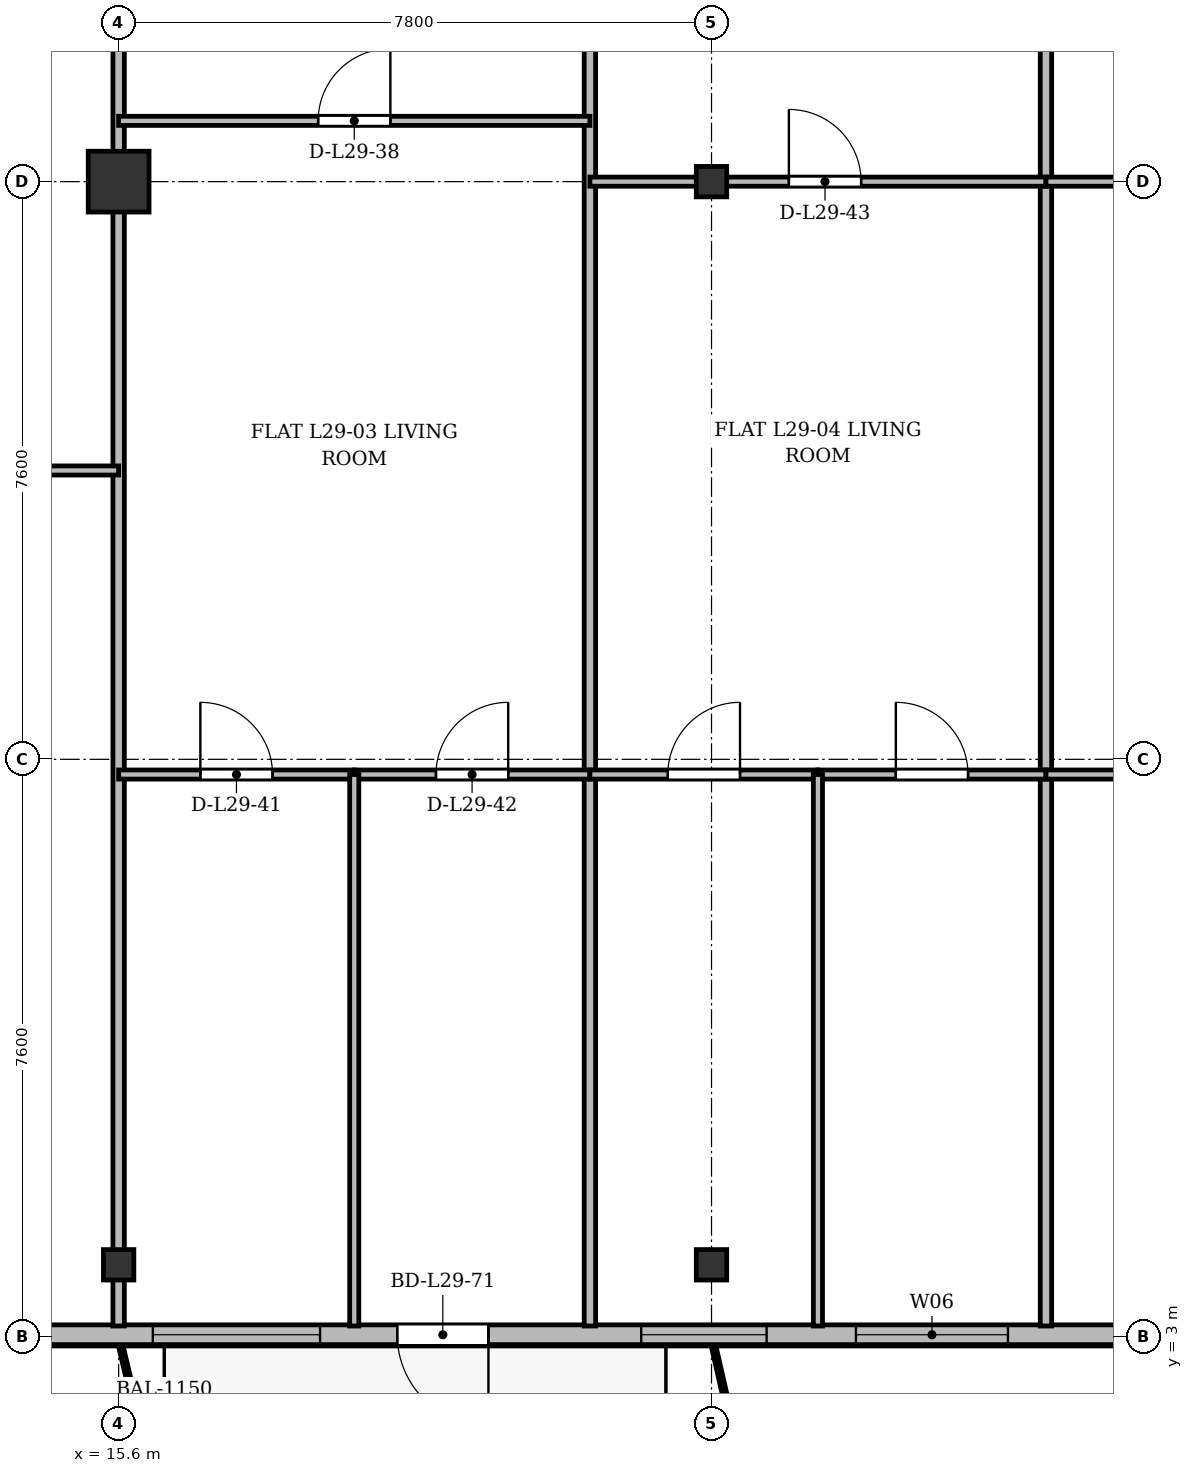
"""IFC4 building model, lengths in metres.
Left out: names, types, materials, properties, quantities, classifications, styles, units other than length and angle.
Written with IfcOpenShell. Run it as: python <this file> out.ifc"""

import sys

from ifc_helpers import new_model, si_unit, direction, frame, frame_2d, origin, origin_2d, place, context, subcontext, project, spatial, rectangle, i_section, extrude, source, transform, mapped, element, fill, save


model = new_model("IFC4")
c1 = context("Model", 3, precision=1e-05, world=origin(), true_north=direction((0.0, 1.0)))
c2 = subcontext(c1, "Body", "Model", "MODEL_VIEW")
j1 = project(units=[si_unit("LENGTHUNIT", "METRE"), si_unit("PLANEANGLEUNIT", "RADIAN")], contexts=[c1])
p1 = place(None, origin())
s1 = spatial("IfcSite", under=j1, at=p1, CompositionType="ELEMENT")
p2 = place(p1, origin())
s2 = spatial("IfcBuilding", under=s1, at=p2, CompositionType="ELEMENT")
p3 = place(p2, frame((0.0, 0.0, 114.1)))
s3 = spatial("IfcBuildingStorey", under=s2, at=p3, CompositionType="ELEMENT", Elevation=114.1)
m1 = source(origin(), c2, "Body", "SweptSolid", [
    extrude(i_section(OverallWidth=0.4, OverallDepth=0.4, WebThickness=0.022, FlangeThickness=0.035, at=origin_2d()), origin(), (0.0, 0.0, 1.0), 3.6),
])
p4 = place(p3, frame((15.6, 3.95, 0.0), z_axis=(0.0, 0.0, 1.0), x_axis=(1.0, 0.0, 0.0)))
e1 = element("IfcColumn", 1, at=p4, inside=s3, PredefinedType="COLUMN", context=c2, shape_type="MappedRepresentation", body=[
    mapped(m1, transform((0.0, 0.0, 0.0), x_axis=(1.0, 0.0, 0.0), y_axis=(0.0, 1.0, 0.0), z_axis=(0.0, 0.0, 1.0), scale=1.0)),
])
m2 = source(origin(), c2, "Body", "SweptSolid", [
    extrude(rectangle(XDim=0.8, YDim=0.8, at=origin_2d()), origin(), (0.0, 0.0, 1.0), 3.6),
])
p5 = place(p3, frame((15.6, 18.2, 0.0), z_axis=(0.0, 0.0, 1.0), x_axis=(1.0, 0.0, 0.0)))
e2 = element("IfcColumn", 2, at=p5, inside=s3, PredefinedType="COLUMN", context=c2, shape_type="MappedRepresentation", body=[
    mapped(m2, transform((0.0, 0.0, 0.0), x_axis=(1.0, 0.0, 0.0), y_axis=(0.0, 1.0, 0.0), z_axis=(0.0, 0.0, 1.0), scale=1.0)),
])
for number, where, z_axis, x_axis in (
    (3, (23.4, 3.95, 0.0), (0.0, 0.0, 1.0), (1.0, 0.0, 0.0)),
    (4, (23.4, 18.2, 0.0), (0.0, 0.0, 1.0), (1.0, 0.0, 0.0)),
):
    element("IfcColumn", number, at=place(p3, frame(where, z_axis=z_axis, x_axis=x_axis)), inside=s3, PredefinedType="COLUMN", context=c2, shape_type="MappedRepresentation", body=[
        mapped(m1, transform((0.0, 0.0, 0.0), x_axis=(1.0, 0.0, 0.0), y_axis=(0.0, 1.0, 0.0), z_axis=(0.0, 0.0, 1.0), scale=1.0)),
    ])
p6 = place(p3, frame((66.9, 3.03, 0.0), z_axis=(0.0, 0.0, 1.0), x_axis=(-1.0, 0.0, 0.0)))
e5 = element("IfcWall", 5, at=p6, inside=s3, PredefinedType="SOLIDWALL", context=c2, shape_type="SweptSolid", body=[
    extrude(rectangle(XDim=59.4, YDim=0.26, at=frame_2d((29.7, 0.0))), origin(), (0.0, 0.0, 1.0), 3.34),
])
p7 = place(p6, frame((0.47, 0.0, 0.9)))
e6 = element("IfcOpeningElement", 6, at=p7, cuts=e5, PredefinedType="OPENING", context=c2, shape_type="SweptSolid", body=[
    extrude(rectangle(XDim=1.65, YDim=1.85, at=frame_2d((0.825, 0.925))), frame((0.0, 0.14, 0.0), z_axis=(0.0, -1.0, 0.0), x_axis=(1.0, 0.0, 0.0)), (0.0, 0.0, 1.0), 0.28),
])
p8 = place(p6, frame((4.4, 0.0, 0.9)))
e7 = element("IfcOpeningElement", 7, at=p8, cuts=e5, PredefinedType="OPENING", context=c2, shape_type="SweptSolid", body=[
    extrude(rectangle(XDim=1.8, YDim=1.8, at=frame_2d((0.9, 0.9))), frame((0.0, 0.14, 0.0), z_axis=(0.0, -1.0, 0.0), x_axis=(1.0, 0.0, 0.0)), (0.0, 0.0, 1.0), 0.28),
])
p9 = place(p6, frame((10.9, 0.0, 0.9)))
e8 = element("IfcOpeningElement", 8, at=p9, cuts=e5, PredefinedType="OPENING", context=c2, shape_type="SweptSolid", body=[
    extrude(rectangle(XDim=2.2, YDim=1.8, at=frame_2d((1.1, 0.9))), frame((0.0, 0.14, 0.0), z_axis=(0.0, -1.0, 0.0), x_axis=(1.0, 0.0, 0.0)), (0.0, 0.0, 1.0), 0.28),
])
p10 = place(p6, frame((16.92, 0.0, 0.0)))
e9 = element("IfcOpeningElement", 9, at=p10, cuts=e5, PredefinedType="OPENING", context=c2, shape_type="SweptSolid", body=[
    extrude(rectangle(XDim=1.2, YDim=2.2, at=frame_2d((0.6, 1.1))), frame((0.0, 0.14, 0.0), z_axis=(0.0, -1.0, 0.0), x_axis=(1.0, 0.0, 0.0)), (0.0, 0.0, 1.0), 0.28),
])
p11 = place(p6, frame((18.75, 0.0, 0.9)))
e10 = element("IfcOpeningElement", 10, at=p11, cuts=e5, PredefinedType="OPENING", context=c2, shape_type="SweptSolid", body=[
    extrude(rectangle(XDim=1.5, YDim=1.75, at=frame_2d((0.75, 0.875))), frame((0.0, 0.14, 0.0), z_axis=(0.0, -1.0, 0.0), x_axis=(1.0, 0.0, 0.0)), (0.0, 0.0, 1.0), 0.28),
])
p12 = place(p6, frame((21.075, 0.0, 0.9)))
e11 = element("IfcOpeningElement", 11, at=p12, cuts=e5, PredefinedType="OPENING", context=c2, shape_type="SweptSolid", body=[
    extrude(rectangle(XDim=1.65, YDim=1.85, at=frame_2d((0.825, 0.925))), frame((0.0, 0.14, 0.0), z_axis=(0.0, -1.0, 0.0), x_axis=(1.0, 0.0, 0.0)), (0.0, 0.0, 1.0), 0.28),
])
p13 = place(p6, frame((26.5, 0.0, 0.9)))
e12 = element("IfcOpeningElement", 12, at=p13, cuts=e5, PredefinedType="OPENING", context=c2, shape_type="SweptSolid", body=[
    extrude(rectangle(XDim=1.8, YDim=1.8, at=frame_2d((0.9, 0.9))), frame((0.0, 0.14, 0.0), z_axis=(0.0, -1.0, 0.0), x_axis=(1.0, 0.0, 0.0)), (0.0, 0.0, 1.0), 0.28),
])
p14 = place(p6, frame((32.45, 0.0, 0.9)))
e13 = element("IfcOpeningElement", 13, at=p14, cuts=e5, PredefinedType="OPENING", context=c2, shape_type="SweptSolid", body=[
    extrude(rectangle(XDim=2.2, YDim=1.8, at=frame_2d((1.1, 0.9))), frame((0.0, 0.14, 0.0), z_axis=(0.0, -1.0, 0.0), x_axis=(1.0, 0.0, 0.0)), (0.0, 0.0, 1.0), 0.28),
])
p15 = place(p6, frame((36.5, 0.0, 0.9)))
e14 = element("IfcOpeningElement", 14, at=p15, cuts=e5, PredefinedType="OPENING", context=c2, shape_type="SweptSolid", body=[
    extrude(rectangle(XDim=1.5, YDim=1.75, at=frame_2d((0.75, 0.875))), frame((0.0, 0.14, 0.0), z_axis=(0.0, -1.0, 0.0), x_axis=(1.0, 0.0, 0.0)), (0.0, 0.0, 1.0), 0.28),
])
p16 = place(p6, frame((39.6, 0.0, 0.9)))
e15 = element("IfcOpeningElement", 15, at=p16, cuts=e5, PredefinedType="OPENING", context=c2, shape_type="SweptSolid", body=[
    extrude(rectangle(XDim=2.0, YDim=1.95, at=frame_2d((1.0, 0.975))), frame((0.0, 0.14, 0.0), z_axis=(0.0, -1.0, 0.0), x_axis=(1.0, 0.0, 0.0)), (0.0, 0.0, 1.0), 0.28),
])
p17 = place(p6, frame((42.775, 0.0, 0.9)))
e16 = element("IfcOpeningElement", 16, at=p17, cuts=e5, PredefinedType="OPENING", context=c2, shape_type="SweptSolid", body=[
    extrude(rectangle(XDim=1.65, YDim=1.85, at=frame_2d((0.825, 0.925))), frame((0.0, 0.14, 0.0), z_axis=(0.0, -1.0, 0.0), x_axis=(1.0, 0.0, 0.0)), (0.0, 0.0, 1.0), 0.28),
])
p18 = place(p6, frame((46.435, 0.0, 0.0)))
e17 = element("IfcOpeningElement", 17, at=p18, cuts=e5, PredefinedType="OPENING", context=c2, shape_type="SweptSolid", body=[
    extrude(rectangle(XDim=1.2, YDim=2.2, at=frame_2d((0.6, 1.1))), frame((0.0, 0.14, 0.0), z_axis=(0.0, -1.0, 0.0), x_axis=(1.0, 0.0, 0.0)), (0.0, 0.0, 1.0), 0.28),
])
p19 = place(p6, frame((48.65, 0.0, 0.9)))
e18 = element("IfcOpeningElement", 18, at=p19, cuts=e5, PredefinedType="OPENING", context=c2, shape_type="SweptSolid", body=[
    extrude(rectangle(XDim=2.2, YDim=1.8, at=frame_2d((1.1, 0.9))), frame((0.0, 0.14, 0.0), z_axis=(0.0, -1.0, 0.0), x_axis=(1.0, 0.0, 0.0)), (0.0, 0.0, 1.0), 0.28),
])
p20 = place(p6, frame((53.25, 0.0, 0.9)))
e19 = element("IfcOpeningElement", 19, at=p20, cuts=e5, PredefinedType="OPENING", context=c2, shape_type="SweptSolid", body=[
    extrude(rectangle(XDim=1.5, YDim=1.75, at=frame_2d((0.75, 0.875))), frame((0.0, 0.14, 0.0), z_axis=(0.0, -1.0, 0.0), x_axis=(1.0, 0.0, 0.0)), (0.0, 0.0, 1.0), 0.28),
])
p21 = place(p6, frame((57.005, 0.0, 0.9)))
e20 = element("IfcOpeningElement", 20, at=p21, cuts=e5, PredefinedType="OPENING", context=c2, shape_type="SweptSolid", body=[
    extrude(rectangle(XDim=2.0, YDim=1.95, at=frame_2d((1.0, 0.975))), frame((0.0, 0.14, 0.0), z_axis=(0.0, -1.0, 0.0), x_axis=(1.0, 0.0, 0.0)), (0.0, 0.0, 1.0), 0.28),
])
p22 = place(p3, frame((15.6, 3.145, 0.0), z_axis=(0.0, 0.0, 1.0), x_axis=(0.0, 1.0, 0.0)))
e21 = element("IfcWall", 21, at=p22, inside=s3, PredefinedType="PARTITIONING", context=c2, shape_type="SweptSolid", body=[
    extrude(rectangle(XDim=24.455, YDim=0.15, at=frame_2d((12.228, 0.0))), origin(), (0.0, 0.0, 1.0), 2.84),
])
for number, where, z_axis, x_axis in (
    (22, (21.8, 3.145, 0.0), (0.0, 0.0, 1.0), (0.0, 1.0, 0.0)),
    (23, (27.8, 3.145, 0.0), (0.0, 0.0, 1.0), (0.0, 1.0, 0.0)),
):
    element("IfcWall", number, at=place(p3, frame(where, z_axis=z_axis, x_axis=x_axis)), inside=s3, PredefinedType="PARTITIONING", context=c2, shape_type="SweptSolid", body=[
        extrude(rectangle(XDim=24.455, YDim=0.15, at=frame_2d((12.228, 0.0))), origin(), (0.0, 0.0, 1.0), 2.752),
    ])
p23 = place(p3, frame((10.2, 14.4, 0.0), z_axis=(0.0, 0.0, 1.0), x_axis=(1.0, 0.0, 0.0)))
e24 = element("IfcWall", 24, at=p23, inside=s3, PredefinedType="PARTITIONING", context=c2, shape_type="SweptSolid", body=[
    extrude(rectangle(XDim=5.4, YDim=0.12, at=frame_2d((2.7, 0.0))), origin(), (0.0, 0.0, 1.0), 2.84),
])
p24 = place(p23, frame((2.225, 0.0, 0.0)))
e25 = element("IfcOpeningElement", 25, at=p24, cuts=e24, PredefinedType="OPENING", context=c2, shape_type="SweptSolid", body=[
    extrude(rectangle(XDim=0.95, YDim=2.15, at=frame_2d((0.475, 1.075))), frame((0.0, 0.07, 0.0), z_axis=(0.0, -1.0, 0.0), x_axis=(1.0, 0.0, 0.0)), (0.0, 0.0, 1.0), 0.14),
])
p25 = place(p3, frame((15.6, 19.0, 0.0), z_axis=(0.0, 0.0, 1.0), x_axis=(1.0, 0.0, 0.0)))
e26 = element("IfcWall", 26, at=p25, inside=s3, PredefinedType="PARTITIONING", context=c2, shape_type="SweptSolid", body=[
    extrude(rectangle(XDim=6.2, YDim=0.12, at=frame_2d((3.1, 0.0))), origin(), (0.0, 0.0, 1.0), 2.84),
])
p26 = place(p25, frame((2.625, 0.0, 0.0)))
e27 = element("IfcOpeningElement", 27, at=p26, cuts=e26, PredefinedType="OPENING", context=c2, shape_type="SweptSolid", body=[
    extrude(rectangle(XDim=0.95, YDim=2.15, at=frame_2d((0.475, 1.075))), frame((0.0, 0.07, 0.0), z_axis=(0.0, -1.0, 0.0), x_axis=(1.0, 0.0, 0.0)), (0.0, 0.0, 1.0), 0.14),
])
p27 = place(p3, frame((15.6, 10.4, 0.0), z_axis=(0.0, 0.0, 1.0), x_axis=(1.0, 0.0, 0.0)))
e28 = element("IfcWall", 28, at=p27, inside=s3, PredefinedType="PARTITIONING", context=c2, shape_type="SweptSolid", body=[
    extrude(rectangle(XDim=3.1, YDim=0.12, at=frame_2d((1.55, 0.0))), origin(), (0.0, 0.0, 1.0), 2.84),
])
p28 = place(p27, frame((1.075, 0.0, 0.0)))
e29 = element("IfcOpeningElement", 29, at=p28, cuts=e28, PredefinedType="OPENING", context=c2, shape_type="SweptSolid", body=[
    extrude(rectangle(XDim=0.95, YDim=2.15, at=frame_2d((0.475, 1.075))), frame((0.0, 0.07, 0.0), z_axis=(0.0, -1.0, 0.0), x_axis=(1.0, 0.0, 0.0)), (0.0, 0.0, 1.0), 0.14),
])
p29 = place(p3, frame((18.7, 10.4, 0.0), z_axis=(0.0, 0.0, 1.0), x_axis=(1.0, 0.0, 0.0)))
e30 = element("IfcWall", 30, at=p29, inside=s3, PredefinedType="PARTITIONING", context=c2, shape_type="SweptSolid", body=[
    extrude(rectangle(XDim=3.1, YDim=0.12, at=frame_2d((1.55, 0.0))), origin(), (0.0, 0.0, 1.0), 3.34),
])
p30 = place(p29, frame((1.075, 0.0, 0.0)))
e31 = element("IfcOpeningElement", 31, at=p30, cuts=e30, PredefinedType="OPENING", context=c2, shape_type="SweptSolid", body=[
    extrude(rectangle(XDim=0.95, YDim=2.15, at=frame_2d((0.475, 1.075))), frame((0.0, 0.07, 0.0), z_axis=(0.0, -1.0, 0.0), x_axis=(1.0, 0.0, 0.0)), (0.0, 0.0, 1.0), 0.14),
])
p31 = place(p3, frame((18.7, 3.145, 0.0), z_axis=(0.0, 0.0, 1.0), x_axis=(0.0, 1.0, 0.0)))
e32 = element("IfcWall", 32, at=p31, inside=s3, PredefinedType="PARTITIONING", context=c2, shape_type="SweptSolid", body=[
    extrude(rectangle(XDim=7.255, YDim=0.12, at=frame_2d((3.627, 0.0))), origin(), (0.0, 0.0, 1.0), 2.752),
])
p32 = place(p3, frame((21.8, 18.2, 0.0), z_axis=(0.0, 0.0, 1.0), x_axis=(1.0, 0.0, 0.0)))
e33 = element("IfcWall", 33, at=p32, inside=s3, PredefinedType="PARTITIONING", context=c2, shape_type="SweptSolid", body=[
    extrude(rectangle(XDim=6.0, YDim=0.12, at=frame_2d((3.0, 0.0))), origin(), (0.0, 0.0, 1.0), 2.752),
])
p33 = place(p32, frame((2.618, 0.0, 0.0)))
e34 = element("IfcOpeningElement", 34, at=p33, cuts=e33, PredefinedType="OPENING", context=c2, shape_type="SweptSolid", body=[
    extrude(rectangle(XDim=0.95, YDim=2.15, at=frame_2d((0.475, 1.075))), frame((0.0, 0.07, 0.0), z_axis=(0.0, -1.0, 0.0), x_axis=(1.0, 0.0, 0.0)), (0.0, 0.0, 1.0), 0.14),
])
p34 = place(p3, frame((21.8, 10.4, 0.0), z_axis=(0.0, 0.0, 1.0), x_axis=(1.0, 0.0, 0.0)))
e35 = element("IfcWall", 35, at=p34, inside=s3, PredefinedType="PARTITIONING", context=c2, shape_type="SweptSolid", body=[
    extrude(rectangle(XDim=3.0, YDim=0.12, at=frame_2d((1.5, 0.0))), origin(), (0.0, 0.0, 1.0), 2.84),
])
p35 = place(p34, frame((1.025, 0.0, 0.0)))
e36 = element("IfcOpeningElement", 36, at=p35, cuts=e35, PredefinedType="OPENING", context=c2, shape_type="SweptSolid", body=[
    extrude(rectangle(XDim=0.95, YDim=2.15, at=frame_2d((0.475, 1.075))), frame((0.0, 0.07, 0.0), z_axis=(0.0, -1.0, 0.0), x_axis=(1.0, 0.0, 0.0)), (0.0, 0.0, 1.0), 0.14),
])
p36 = place(p3, frame((24.8, 10.4, 0.0), z_axis=(0.0, 0.0, 1.0), x_axis=(1.0, 0.0, 0.0)))
e37 = element("IfcWall", 37, at=p36, inside=s3, PredefinedType="PARTITIONING", context=c2, shape_type="SweptSolid", body=[
    extrude(rectangle(XDim=3.0, YDim=0.12, at=frame_2d((1.5, 0.0))), origin(), (0.0, 0.0, 1.0), 3.34),
])
p37 = place(p36, frame((1.025, 0.0, 0.0)))
e38 = element("IfcOpeningElement", 38, at=p37, cuts=e37, PredefinedType="OPENING", context=c2, shape_type="SweptSolid", body=[
    extrude(rectangle(XDim=0.95, YDim=2.15, at=frame_2d((0.475, 1.075))), frame((0.0, 0.07, 0.0), z_axis=(0.0, -1.0, 0.0), x_axis=(1.0, 0.0, 0.0)), (0.0, 0.0, 1.0), 0.14),
])
p38 = place(p3, frame((24.8, 3.145, 0.0), z_axis=(0.0, 0.0, 1.0), x_axis=(0.0, 1.0, 0.0)))
e39 = element("IfcWall", 39, at=p38, inside=s3, PredefinedType="PARTITIONING", context=c2, shape_type="SweptSolid", body=[
    extrude(rectangle(XDim=7.255, YDim=0.12, at=frame_2d((3.627, 0.0))), origin(), (0.0, 0.0, 1.0), 2.752),
])
p39 = place(p3, frame((27.8, 18.2, 0.0), z_axis=(0.0, 0.0, 1.0), x_axis=(1.0, 0.0, 0.0)))
e40 = element("IfcWall", 40, at=p39, inside=s3, PredefinedType="PARTITIONING", context=c2, shape_type="SweptSolid", body=[
    extrude(rectangle(XDim=7.4, YDim=0.12, at=frame_2d((3.7, 0.0))), origin(), (0.0, 0.0, 1.0), 2.752),
])
p40 = place(p39, frame((4.051, 0.0, 0.0)))
e41 = element("IfcOpeningElement", 41, at=p40, cuts=e40, PredefinedType="OPENING", context=c2, shape_type="SweptSolid", body=[
    extrude(rectangle(XDim=0.95, YDim=2.15, at=frame_2d((0.475, 1.075))), frame((0.0, 0.07, 0.0), z_axis=(0.0, -1.0, 0.0), x_axis=(1.0, 0.0, 0.0)), (0.0, 0.0, 1.0), 0.14),
])
p41 = place(p3, frame((27.8, 10.4, 0.0), z_axis=(0.0, 0.0, 1.0), x_axis=(1.0, 0.0, 0.0)))
e42 = element("IfcWall", 42, at=p41, inside=s3, PredefinedType="PARTITIONING", context=c2, shape_type="SweptSolid", body=[
    extrude(rectangle(XDim=3.7, YDim=0.12, at=frame_2d((1.85, 0.0))), origin(), (0.0, 0.0, 1.0), 2.84),
])
p42 = place(p41, frame((1.285, 0.0, 0.0)))
e43 = element("IfcOpeningElement", 43, at=p42, cuts=e42, PredefinedType="OPENING", context=c2, shape_type="SweptSolid", body=[
    extrude(rectangle(XDim=0.95, YDim=2.15, at=frame_2d((0.475, 1.075))), frame((0.0, 0.07, 0.0), z_axis=(0.0, -1.0, 0.0), x_axis=(1.0, 0.0, 0.0)), (0.0, 0.0, 1.0), 0.14),
])
m3 = source(origin(), c2, "Body", "SweptSolid", [
    extrude(rectangle(XDim=2.0, YDim=1.95, at=frame_2d((1.0, 0.975))), frame((0.0, 0.03, 0.0), z_axis=(0.0, -1.0, 0.0), x_axis=(1.0, 0.0, 0.0)), (0.0, 0.0, 1.0), 0.06),
])
p43 = place(p16, origin())
e44 = element("IfcWindow", 44, at=p43, inside=s3, PartitioningType="SINGLE_PANEL", PredefinedType="WINDOW", context=c2, shape_type="MappedRepresentation", body=[
    mapped(m3, transform((0.0, 0.0, 0.0), x_axis=(1.0, 0.0, 0.0), y_axis=(0.0, 1.0, 0.0), z_axis=(0.0, 0.0, 1.0), scale=1.0)),
])
fill(e15, e44)
m4 = source(origin(), c2, "Body", "SweptSolid", [
    extrude(rectangle(XDim=1.65, YDim=1.85, at=frame_2d((0.825, 0.925))), frame((0.0, 0.03, 0.0), z_axis=(0.0, -1.0, 0.0), x_axis=(1.0, 0.0, 0.0)), (0.0, 0.0, 1.0), 0.06),
])
p44 = place(p17, origin())
e45 = element("IfcWindow", 45, at=p44, inside=s3, PartitioningType="SINGLE_PANEL", PredefinedType="WINDOW", context=c2, shape_type="MappedRepresentation", body=[
    mapped(m4, transform((0.0, 0.0, 0.0), x_axis=(1.0, 0.0, 0.0), y_axis=(0.0, 1.0, 0.0), z_axis=(0.0, 0.0, 1.0), scale=1.0)),
])
fill(e16, e45)
m5 = source(origin(), c2, "Body", "SweptSolid", [
    extrude(rectangle(XDim=1.2, YDim=2.2, at=frame_2d((0.6, 1.1))), frame((0.0, 0.025, 0.0), z_axis=(0.0, -1.0, 0.0), x_axis=(1.0, 0.0, 0.0)), (0.0, 0.0, 1.0), 0.05),
])
p45 = place(p18, origin())
e46 = element("IfcDoor", 46, at=p45, inside=s3, OperationType="SINGLE_SWING_LEFT", PredefinedType="DOOR", context=c2, shape_type="MappedRepresentation", body=[
    mapped(m5, transform((0.0, 0.0, 0.0), x_axis=(1.0, 0.0, 0.0), y_axis=(0.0, 1.0, 0.0), z_axis=(0.0, 0.0, 1.0), scale=1.0)),
])
fill(e17, e46)
m6 = source(origin(), c2, "Body", "SweptSolid", [
    extrude(rectangle(XDim=2.2, YDim=1.8, at=frame_2d((1.1, 0.9))), frame((0.0, 0.03, 0.0), z_axis=(0.0, -1.0, 0.0), x_axis=(1.0, 0.0, 0.0)), (0.0, 0.0, 1.0), 0.06),
])
p46 = place(p19, origin())
e47 = element("IfcWindow", 47, at=p46, inside=s3, PartitioningType="SINGLE_PANEL", PredefinedType="WINDOW", context=c2, shape_type="MappedRepresentation", body=[
    mapped(m6, transform((0.0, 0.0, 0.0), x_axis=(1.0, 0.0, 0.0), y_axis=(0.0, 1.0, 0.0), z_axis=(0.0, 0.0, 1.0), scale=1.0)),
])
fill(e18, e47)
m7 = source(origin(), c2, "Body", "SweptSolid", [
    extrude(rectangle(XDim=0.95, YDim=2.15, at=frame_2d((0.475, 1.075))), frame((0.0, 0.025, 0.0), z_axis=(0.0, -1.0, 0.0), x_axis=(1.0, 0.0, 0.0)), (0.0, 0.0, 1.0), 0.05),
])
p47 = place(p26, origin())
e48 = element("IfcDoor", 48, at=p47, inside=s3, OperationType="SINGLE_SWING_RIGHT", PredefinedType="DOOR", context=c2, shape_type="MappedRepresentation", body=[
    mapped(m7, transform((0.0, 0.0, 0.0), x_axis=(1.0, 0.0, 0.0), y_axis=(0.0, 1.0, 0.0), z_axis=(0.0, 0.0, 1.0), scale=1.0)),
])
fill(e27, e48)
p48 = place(p28, origin())
e49 = element("IfcDoor", 49, at=p48, inside=s3, OperationType="SINGLE_SWING_LEFT", PredefinedType="DOOR", context=c2, shape_type="MappedRepresentation", body=[
    mapped(m7, transform((0.0, 0.0, 0.0), x_axis=(1.0, 0.0, 0.0), y_axis=(0.0, 1.0, 0.0), z_axis=(0.0, 0.0, 1.0), scale=1.0)),
])
fill(e29, e49)
p49 = place(p30, origin())
e50 = element("IfcDoor", 50, at=p49, inside=s3, OperationType="SINGLE_SWING_RIGHT", PredefinedType="DOOR", context=c2, shape_type="MappedRepresentation", body=[
    mapped(m7, transform((0.0, 0.0, 0.0), x_axis=(1.0, 0.0, 0.0), y_axis=(0.0, 1.0, 0.0), z_axis=(0.0, 0.0, 1.0), scale=1.0)),
])
fill(e31, e50)
p50 = place(p33, origin())
e51 = element("IfcDoor", 51, at=p50, inside=s3, OperationType="SINGLE_SWING_LEFT", PredefinedType="DOOR", context=c2, shape_type="MappedRepresentation", body=[
    mapped(m7, transform((0.0, 0.0, 0.0), x_axis=(1.0, 0.0, 0.0), y_axis=(0.0, 1.0, 0.0), z_axis=(0.0, 0.0, 1.0), scale=1.0)),
])
fill(e34, e51)
p51 = place(p35, origin())
e52 = element("IfcDoor", 52, at=p51, inside=s3, OperationType="SINGLE_SWING_RIGHT", PredefinedType="DOOR", context=c2, shape_type="MappedRepresentation", body=[
    mapped(m7, transform((0.0, 0.0, 0.0), x_axis=(1.0, 0.0, 0.0), y_axis=(0.0, 1.0, 0.0), z_axis=(0.0, 0.0, 1.0), scale=1.0)),
])
fill(e36, e52)
p52 = place(p37, origin())
e53 = element("IfcDoor", 53, at=p52, inside=s3, OperationType="SINGLE_SWING_LEFT", PredefinedType="DOOR", context=c2, shape_type="MappedRepresentation", body=[
    mapped(m7, transform((0.0, 0.0, 0.0), x_axis=(1.0, 0.0, 0.0), y_axis=(0.0, 1.0, 0.0), z_axis=(0.0, 0.0, 1.0), scale=1.0)),
])
fill(e38, e53)
save(model, sys.argv[1])
